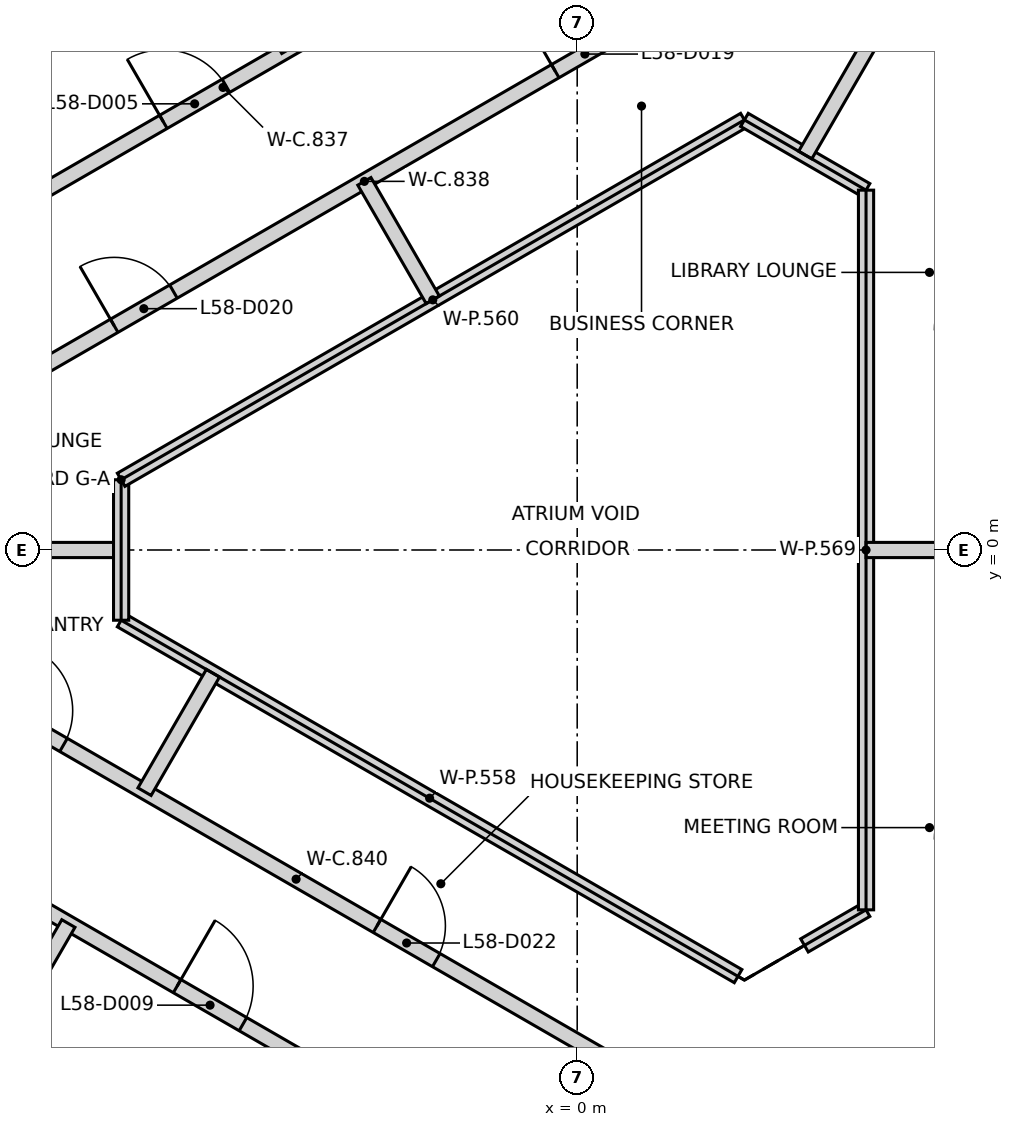
"""IFC4 building model, lengths in metres.
Left out: names, types, materials, properties, quantities, classifications, styles, units other than length and angle.
Written with IfcOpenShell. Run it as: python <this file> out.ifc"""

import sys

from ifc_helpers import new_model, si_unit, direction, frame, frame_2d, origin, place, context, subcontext, project, spatial, rectangle, extrude, element, fill, save


model = new_model("IFC4")
c1 = context("Model", 3, precision=1e-05, world=origin(), true_north=direction((0.0, 1.0)))
c2 = subcontext(c1, "Body", "Model", "MODEL_VIEW")
j1 = project(units=[si_unit("LENGTHUNIT", "METRE"), si_unit("PLANEANGLEUNIT", "RADIAN")], contexts=[c1])
p1 = place(None, origin())
s1 = spatial("IfcSite", under=j1, at=p1, CompositionType="ELEMENT")
p2 = place(p1, origin())
s2 = spatial("IfcBuilding", under=s1, at=p2, CompositionType="ELEMENT")
p3 = place(p2, frame((0.0, 0.0, 232.2)))
s3 = spatial("IfcBuildingStorey", under=s2, at=p3, CompositionType="ELEMENT", Elevation=232.2)
p4 = place(p3, frame((10.42, 6.498, 0.0), z_axis=(0.0, 0.0, 1.0), x_axis=(-0.866021906294, 0.500006057782, 0.0)))
e1 = element("IfcWall", 1, at=p4, inside=s3, PredefinedType="SHEAR", context=c2, shape_type="SweptSolid", body=[
    extrude(rectangle(XDim=11.55, YDim=0.25, at=frame_2d((5.775, 0.0))), origin(), (0.0, 0.0, 1.0), 3.25),
])
p5 = place(p4, frame((10.025, 0.0, 0.0)))
e2 = element("IfcOpeningElement", 2, at=p5, cuts=e1, PredefinedType="OPENING", context=c2, shape_type="SweptSolid", body=[
    extrude(rectangle(XDim=1.2, YDim=2.1, at=frame_2d((0.6, 1.05))), frame((0.0, 0.135, 0.0), z_axis=(0.0, -1.0, 0.0), x_axis=(1.0, 0.0, 0.0)), (0.0, 0.0, 1.0), 0.27),
])
p6 = place(p4, frame((8.725, 0.0, 0.0)))
e3 = element("IfcOpeningElement", 3, at=p6, cuts=e1, PredefinedType="OPENING", context=c2, shape_type="SweptSolid", body=[
    extrude(rectangle(XDim=1.2, YDim=2.1, at=frame_2d((0.6, 1.05))), frame((0.0, 0.135, 0.0), z_axis=(0.0, -1.0, 0.0), x_axis=(1.0, 0.0, 0.0)), (0.0, 0.0, 1.0), 0.27),
])
p7 = place(p3, frame((0.417, -12.273, 0.0), z_axis=(0.0, 0.0, 1.0), x_axis=(0.866021906294, 0.500006057782, 0.0)))
e4 = element("IfcWall", 4, at=p7, inside=s3, PredefinedType="SHEAR", context=c2, shape_type="SweptSolid", body=[
    extrude(rectangle(XDim=11.55, YDim=0.25, at=frame_2d((5.775, 0.0))), origin(), (0.0, 0.0, 1.0), 3.25),
])
p8 = place(p7, frame((10.025, 0.0, 0.0)))
e5 = element("IfcOpeningElement", 5, at=p8, cuts=e4, PredefinedType="OPENING", context=c2, shape_type="SweptSolid", body=[
    extrude(rectangle(XDim=1.2, YDim=2.1, at=frame_2d((0.6, 1.05))), frame((0.0, 0.135, 0.0), z_axis=(0.0, -1.0, 0.0), x_axis=(1.0, 0.0, 0.0)), (0.0, 0.0, 1.0), 0.27),
])
p9 = place(p7, frame((8.725, 0.0, 0.0)))
e6 = element("IfcOpeningElement", 6, at=p9, cuts=e4, PredefinedType="OPENING", context=c2, shape_type="SweptSolid", body=[
    extrude(rectangle(XDim=1.2, YDim=2.1, at=frame_2d((0.6, 1.05))), frame((0.0, 0.135, 0.0), z_axis=(0.0, -1.0, 0.0), x_axis=(1.0, 0.0, 0.0)), (0.0, 0.0, 1.0), 0.27),
])
p10 = place(p3, frame((-9.817, 3.108, 0.0), z_axis=(0.0, 0.0, 1.0), x_axis=(0.86603471326, 0.499983875168, 0.0)))
e7 = element("IfcWall", 7, at=p10, inside=s3, PredefinedType="PARTITIONING", context=c2, shape_type="SweptSolid", body=[
    extrude(rectangle(XDim=11.911, YDim=0.2, at=frame_2d((5.955, 0.0))), origin(), (0.0, 0.0, 1.0), 3.25),
])
p11 = place(p10, frame((7.136, 0.0, 0.0)))
e8 = element("IfcOpeningElement", 8, at=p11, cuts=e7, PredefinedType="OPENING", context=c2, shape_type="SweptSolid", body=[
    extrude(rectangle(XDim=0.95, YDim=2.1, at=frame_2d((0.475, 1.05))), frame((0.0, 0.11, 0.0), z_axis=(0.0, -1.0, 0.0), x_axis=(1.0, 0.0, 0.0)), (0.0, 0.0, 1.0), 0.22),
])
p12 = place(p10, frame((5.049, 0.0, 0.0)))
e9 = element("IfcOpeningElement", 9, at=p12, cuts=e7, PredefinedType="OPENING", context=c2, shape_type="SweptSolid", body=[
    extrude(rectangle(XDim=0.95, YDim=2.1, at=frame_2d((0.475, 1.05))), frame((0.0, 0.11, 0.0), z_axis=(0.0, -1.0, 0.0), x_axis=(1.0, 0.0, 0.0)), (0.0, 0.0, 1.0), 0.22),
])
p13 = place(p3, frame((-8.612, 1.494, 0.0), z_axis=(0.0, 0.0, 1.0), x_axis=(0.8660441356, 0.49996755414, 0.0)))
e10 = element("IfcWall", 10, at=p13, inside=s3, PredefinedType="PARTITIONING", context=c2, shape_type="SweptSolid", body=[
    extrude(rectangle(XDim=13.422, YDim=0.2, at=frame_2d((6.711, 0.0))), origin(), (0.0, 0.0, 1.0), 3.25),
])
p14 = place(p13, frame((9.611, 0.0, 0.0)))
e11 = element("IfcOpeningElement", 11, at=p14, cuts=e10, PredefinedType="OPENING", context=c2, shape_type="SweptSolid", body=[
    extrude(rectangle(XDim=0.9, YDim=2.1, at=frame_2d((0.45, 1.05))), frame((0.0, 0.11, 0.0), z_axis=(0.0, -1.0, 0.0), x_axis=(1.0, 0.0, 0.0)), (0.0, 0.0, 1.0), 0.22),
])
p15 = place(p13, frame((2.911, 0.0, 0.0)))
e12 = element("IfcOpeningElement", 12, at=p15, cuts=e10, PredefinedType="OPENING", context=c2, shape_type="SweptSolid", body=[
    extrude(rectangle(XDim=0.9, YDim=2.1, at=frame_2d((0.45, 1.05))), frame((0.0, 0.11, 0.0), z_axis=(0.0, -1.0, 0.0), x_axis=(1.0, 0.0, 0.0)), (0.0, 0.0, 1.0), 0.22),
])
p16 = place(p3, frame((-8.612, -1.494, 0.0), z_axis=(0.0, 0.0, 1.0), x_axis=(0.866035468681, -0.499982566683, 0.0)))
e13 = element("IfcWall", 13, at=p16, inside=s3, PredefinedType="PARTITIONING", context=c2, shape_type="SweptSolid", body=[
    extrude(rectangle(XDim=11.348, YDim=0.2, at=frame_2d((5.674, 0.0))), origin(), (0.0, 0.0, 1.0), 3.25),
])
p17 = place(p16, frame((1.241, 0.0, 0.0)))
e14 = element("IfcOpeningElement", 14, at=p17, cuts=e13, PredefinedType="OPENING", context=c2, shape_type="SweptSolid", body=[
    extrude(rectangle(XDim=0.9, YDim=2.1, at=frame_2d((0.45, 1.05))), frame((0.0, 0.11, 0.0), z_axis=(0.0, -1.0, 0.0), x_axis=(1.0, 0.0, 0.0)), (0.0, 0.0, 1.0), 0.22),
])
p18 = place(p16, frame((6.903, 0.0, 0.0)))
e15 = element("IfcOpeningElement", 15, at=p18, cuts=e13, PredefinedType="OPENING", context=c2, shape_type="SweptSolid", body=[
    extrude(rectangle(XDim=0.9, YDim=2.1, at=frame_2d((0.45, 1.05))), frame((0.0, 0.11, 0.0), z_axis=(0.0, -1.0, 0.0), x_axis=(1.0, 0.0, 0.0)), (0.0, 0.0, 1.0), 0.22),
])
p19 = place(p3, frame((-8.153, -4.069, 0.0), z_axis=(0.0, 0.0, 1.0), x_axis=(0.865955522833, -0.500121017829, 0.0)))
e16 = element("IfcWall", 16, at=p19, inside=s3, PredefinedType="PARTITIONING", context=c2, shape_type="SweptSolid", body=[
    extrude(rectangle(XDim=12.937, YDim=0.2, at=frame_2d((6.469, 0.0))), origin(), (0.0, 0.0, 1.0), 3.25),
])
p20 = place(p19, frame((3.337, 0.0, 0.0)))
e17 = element("IfcOpeningElement", 17, at=p20, cuts=e16, PredefinedType="OPENING", context=c2, shape_type="SweptSolid", body=[
    extrude(rectangle(XDim=1.0, YDim=2.1, at=frame_2d((0.5, 1.05))), frame((0.0, 0.11, 0.0), z_axis=(0.0, -1.0, 0.0), x_axis=(1.0, 0.0, 0.0)), (0.0, 0.0, 1.0), 0.22),
])
p21 = place(p19, frame((9.153, 0.0, 0.0)))
e18 = element("IfcOpeningElement", 18, at=p21, cuts=e16, PredefinedType="OPENING", context=c2, shape_type="SweptSolid", body=[
    extrude(rectangle(XDim=0.95, YDim=2.1, at=frame_2d((0.475, 1.05))), frame((0.0, 0.11, 0.0), z_axis=(0.0, -1.0, 0.0), x_axis=(1.0, 0.0, 0.0)), (0.0, 0.0, 1.0), 0.22),
])
p22 = place(p19, frame((11.144, 0.0, 0.0)))
e19 = element("IfcOpeningElement", 19, at=p22, cuts=e16, PredefinedType="OPENING", context=c2, shape_type="SweptSolid", body=[
    extrude(rectangle(XDim=1.0, YDim=2.1, at=frame_2d((0.5, 1.05))), frame((0.0, 0.11, 0.0), z_axis=(0.0, -1.0, 0.0), x_axis=(1.0, 0.0, 0.0)), (0.0, 0.0, 1.0), 0.22),
])
p23 = place(p3, frame((-12.407, -14.806, 0.0), z_axis=(0.0, 0.0, 1.0), x_axis=(0.500104175471, 0.865965249693, 0.0)))
e20 = element("IfcWall", 20, at=p23, inside=s3, PredefinedType="PARTITIONING", context=c2, shape_type="SweptSolid", body=[
    extrude(rectangle(XDim=11.423, YDim=0.2, at=frame_2d((5.711, 0.0))), origin(), (0.0, 0.0, 1.0), 2.35),
])
p24 = place(p3, frame((-9.525, 16.498, 0.0), z_axis=(0.0, 0.0, 1.0), x_axis=(0.500030684965, -0.866007687087, 0.0)))
e21 = element("IfcWall", 21, at=p24, inside=s3, PredefinedType="PARTITIONING", context=c2, shape_type="SweptSolid", body=[
    extrude(rectangle(XDim=11.45, YDim=0.2, at=frame_2d((5.725, 0.0))), origin(), (0.0, 0.0, 1.0), 3.25),
])
p25 = place(p3, frame((-8.547, 0.0, 0.0), z_axis=(0.0, 0.0, 1.0), x_axis=(1.0, 0.0, 0.0)))
e22 = element("IfcWall", 22, at=p25, inside=s3, PredefinedType="PARTITIONING", context=c2, shape_type="SweptSolid", body=[
    extrude(rectangle(XDim=2.547, YDim=0.2, at=frame_2d((1.273, 0.0))), origin(), (0.0, 0.0, 1.0), 3.25),
])
p26 = place(p3, frame((-6.0, -0.924, 0.0), z_axis=(0.0, 0.0, 1.0), x_axis=(0.866223755075, -0.499656288007, 0.0)))
e23 = element("IfcWall", 23, at=p26, inside=s3, PredefinedType="PARTITIONING", context=c2, shape_type="SweptSolid", body=[
    extrude(rectangle(XDim=9.37, YDim=0.2, at=frame_2d((4.685, 0.0))), origin(), (0.0, 0.0, 1.0), 3.25),
])
p27 = place(p3, frame((-6.0, -0.924, 0.0), z_axis=(0.0, 0.0, 1.0), x_axis=(0.0, 1.0, 0.0)))
e24 = element("IfcWall", 24, at=p27, inside=s3, PredefinedType="PARTITIONING", context=c2, shape_type="SweptSolid", body=[
    extrude(rectangle(XDim=1.848, YDim=0.2, at=frame_2d((0.924, 0.0))), origin(), (0.0, 0.0, 1.0), 3.25),
])
p28 = place(p3, frame((-6.0, 0.924, 0.0), z_axis=(0.0, 0.0, 1.0), x_axis=(0.866012967051, 0.500021540435, 0.0)))
e25 = element("IfcWall", 25, at=p28, inside=s3, PredefinedType="PARTITIONING", context=c2, shape_type="SweptSolid", body=[
    extrude(rectangle(XDim=9.468, YDim=0.2, at=frame_2d((4.734, 0.0))), origin(), (0.0, 0.0, 1.0), 3.25),
])
for number, where, z_axis, x_axis in (
    (26, (-5.692, -3.179, 0.0), (0.0, 0.0, 1.0), (0.5, 0.866, 0.0)),
    (27, (-2.8, 4.85, 0.0), (0.0, 0.0, 1.0), (0.5, -0.866, 0.0)),
):
    element("IfcWall", number, at=place(p3, frame(where, z_axis=z_axis, x_axis=x_axis)), inside=s3, PredefinedType="PARTITIONING", context=c2, shape_type="SweptSolid", body=[
        extrude(rectangle(XDim=1.8, YDim=0.2, at=frame_2d((0.9, 0.0))), origin(), (0.0, 0.0, 1.0), 3.25),
    ])
p29 = place(p3, frame((2.2, 5.658, 0.0), z_axis=(0.0, 0.0, 1.0), x_axis=(0.865818011038, -0.500359042851, 0.0)))
e28 = element("IfcWall", 28, at=p29, inside=s3, PredefinedType="PARTITIONING", context=c2, shape_type="SweptSolid", body=[
    extrude(rectangle(XDim=1.848, YDim=0.2, at=frame_2d((0.924, 0.0))), origin(), (0.0, 0.0, 1.0), 3.25),
])
p30 = place(p3, frame((2.99, -5.202, 0.0), z_axis=(0.0, 0.0, 1.0), x_axis=(0.865872609263, 0.500264554538, 0.0)))
e29 = element("IfcWall", 29, at=p30, inside=s3, PredefinedType="PARTITIONING", context=c2, shape_type="SweptSolid", body=[
    extrude(rectangle(XDim=0.936, YDim=0.2, at=frame_2d((0.468, 0.0))), origin(), (0.0, 0.0, 1.0), 3.25),
])
p31 = place(p3, frame((3.0, 5.196, 0.0), z_axis=(0.0, 0.0, 1.0), x_axis=(0.500076354988, 0.865981315724, 0.0)))
e30 = element("IfcWall", 30, at=p31, inside=s3, PredefinedType="PARTITIONING", context=c2, shape_type="SweptSolid", body=[
    extrude(rectangle(XDim=2.607, YDim=0.2, at=frame_2d((1.304, 0.0))), origin(), (0.0, 0.0, 1.0), 3.25),
])
p32 = place(p3, frame((3.8, -4.734, 0.0), z_axis=(0.0, 0.0, 1.0), x_axis=(0.0, 1.0, 0.0)))
e31 = element("IfcWall", 31, at=p32, inside=s3, PredefinedType="PARTITIONING", context=c2, shape_type="SweptSolid", body=[
    extrude(rectangle(XDim=9.468, YDim=0.2, at=frame_2d((4.734, 0.0))), origin(), (0.0, 0.0, 1.0), 3.25),
])
p33 = place(p3, frame((3.8, 0.0, 0.0), z_axis=(0.0, 0.0, 1.0), x_axis=(1.0, 0.0, 0.0)))
e32 = element("IfcWall", 32, at=p33, inside=s3, PredefinedType="PARTITIONING", context=c2, shape_type="SweptSolid", body=[
    extrude(rectangle(XDim=1.8, YDim=0.2, at=frame_2d((0.9, 0.0))), origin(), (0.0, 0.0, 1.0), 3.25),
])
p34 = place(p12, origin())
e33 = element("IfcDoor", 33, at=p34, inside=s3, OperationType="SINGLE_SWING_LEFT", PredefinedType="DOOR", context=c2, shape_type="SweptSolid", body=[
    extrude(rectangle(XDim=0.95, YDim=2.1, at=frame_2d((0.475, 1.05))), frame((0.0, 0.025, 0.0), z_axis=(0.0, -1.0, 0.0), x_axis=(1.0, 0.0, 0.0)), (0.0, 0.0, 1.0), 0.05),
])
fill(e9, e33)
p35 = place(p20, frame((1.0, 0.0, 0.0), z_axis=(0.0, 0.0, 1.0), x_axis=(-1.0, 0.0, 0.0)))
e34 = element("IfcDoor", 34, at=p35, inside=s3, OperationType="SINGLE_SWING_LEFT", PredefinedType="DOOR", context=c2, shape_type="SweptSolid", body=[
    extrude(rectangle(XDim=1.0, YDim=2.1, at=frame_2d((0.5, 1.05))), frame((0.0, 0.025, 0.0), z_axis=(0.0, -1.0, 0.0), x_axis=(1.0, 0.0, 0.0)), (0.0, 0.0, 1.0), 0.05),
])
fill(e17, e34)
p36 = place(p14, frame((0.9, 0.0, 0.0), z_axis=(0.0, 0.0, 1.0), x_axis=(-1.0, 0.0, 0.0)))
e35 = element("IfcDoor", 35, at=p36, inside=s3, OperationType="SINGLE_SWING_LEFT", PredefinedType="DOOR", context=c2, shape_type="SweptSolid", body=[
    extrude(rectangle(XDim=0.9, YDim=2.1, at=frame_2d((0.45, 1.05))), frame((0.0, 0.025, 0.0), z_axis=(0.0, -1.0, 0.0), x_axis=(1.0, 0.0, 0.0)), (0.0, 0.0, 1.0), 0.05),
])
fill(e11, e35)
p37 = place(p15, frame((0.9, 0.0, 0.0), z_axis=(0.0, 0.0, 1.0), x_axis=(-1.0, 0.0, 0.0)))
e36 = element("IfcDoor", 36, at=p37, inside=s3, OperationType="SINGLE_SWING_LEFT", PredefinedType="DOOR", context=c2, shape_type="SweptSolid", body=[
    extrude(rectangle(XDim=0.9, YDim=2.1, at=frame_2d((0.45, 1.05))), frame((0.0, 0.025, 0.0), z_axis=(0.0, -1.0, 0.0), x_axis=(1.0, 0.0, 0.0)), (0.0, 0.0, 1.0), 0.05),
])
fill(e12, e36)
p38 = place(p17, origin())
e37 = element("IfcDoor", 37, at=p38, inside=s3, OperationType="SINGLE_SWING_LEFT", PredefinedType="DOOR", context=c2, shape_type="SweptSolid", body=[
    extrude(rectangle(XDim=0.9, YDim=2.1, at=frame_2d((0.45, 1.05))), frame((0.0, 0.025, 0.0), z_axis=(0.0, -1.0, 0.0), x_axis=(1.0, 0.0, 0.0)), (0.0, 0.0, 1.0), 0.05),
])
fill(e14, e37)
p39 = place(p18, origin())
e38 = element("IfcDoor", 38, at=p39, inside=s3, OperationType="SINGLE_SWING_LEFT", PredefinedType="DOOR", context=c2, shape_type="SweptSolid", body=[
    extrude(rectangle(XDim=0.9, YDim=2.1, at=frame_2d((0.45, 1.05))), frame((0.0, 0.025, 0.0), z_axis=(0.0, -1.0, 0.0), x_axis=(1.0, 0.0, 0.0)), (0.0, 0.0, 1.0), 0.05),
])
fill(e15, e38)
save(model, sys.argv[1])
